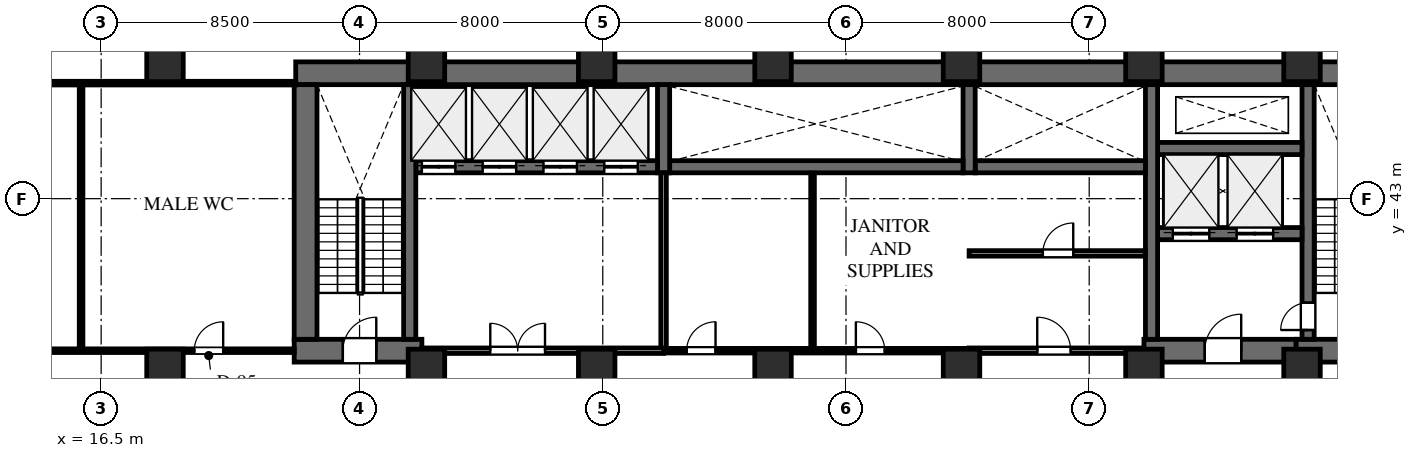
"""IFC4 building model, lengths in metres.
Left out: names, types, materials, properties, quantities, classifications, styles, units other than length and angle.
Written with IfcOpenShell. Run it as: python <this file> out.ifc"""

import sys

from ifc_helpers import new_model, si_unit, direction, frame, frame_2d, origin, origin_2d, place, context, subcontext, project, spatial, rectangle, extrude, element, fill, save


model = new_model("IFC4")
c1 = context("Model", 3, precision=1e-05, world=origin(), true_north=direction((0.0, 1.0)))
c2 = subcontext(c1, "Body", "Model", "MODEL_VIEW")
j1 = project(units=[si_unit("LENGTHUNIT", "METRE"), si_unit("PLANEANGLEUNIT", "RADIAN")], contexts=[c1])
p1 = place(None, origin())
s1 = spatial("IfcSite", under=j1, at=p1, CompositionType="ELEMENT")
p2 = place(p1, origin())
s2 = spatial("IfcBuilding", under=s1, at=p2, CompositionType="ELEMENT")
p3 = place(p2, frame((0.0, 0.0, 29.5)))
s3 = spatial("IfcBuildingStorey", under=s2, at=p3, CompositionType="ELEMENT", Elevation=29.5)
p4 = place(p3, frame((22.9, 47.125, 0.0), z_axis=(0.0, 0.0, 1.0), x_axis=(1.0, 0.0, 0.0)))
e1 = element("IfcWall", 1, at=p4, inside=s3, PredefinedType="SHEAR", context=c2, shape_type="SweptSolid", body=[
    extrude(rectangle(XDim=43.7, YDim=0.75, at=frame_2d((21.85, 0.0))), origin(), (0.0, 0.0, 1.0), 4.0),
])
p5 = place(p3, frame((55.8, 38.0, 0.0), z_axis=(0.0, 0.0, 1.0), x_axis=(1.0, 0.0, 0.0)))
e2 = element("IfcWall", 2, at=p5, inside=s3, PredefinedType="SHEAR", context=c2, shape_type="SweptSolid", body=[
    extrude(rectangle(XDim=10.8, YDim=0.75, at=frame_2d((5.4, 0.0))), origin(), (0.0, 0.0, 1.0), 4.0),
])
p6 = place(p5, frame((1.5, 0.0, 0.0)))
e3 = element("IfcOpeningElement", 3, at=p6, cuts=e2, PredefinedType="OPENING", context=c2, shape_type="SweptSolid", body=[
    extrude(rectangle(XDim=1.1, YDim=2.2, at=frame_2d((0.55, 1.1))), frame((0.0, 0.385, 0.0), z_axis=(0.0, -1.0, 0.0), x_axis=(1.0, 0.0, 0.0)), (0.0, 0.0, 1.0), 0.77),
])
p7 = place(p5, frame((4.82, 0.0, 0.0)))
e4 = element("IfcOpeningElement", 4, at=p7, cuts=e2, PredefinedType="OPENING", context=c2, shape_type="SweptSolid", body=[
    extrude(rectangle(XDim=1.0, YDim=2.15, at=frame_2d((0.5, 1.075))), frame((0.0, 0.385, 0.0), z_axis=(0.0, -1.0, 0.0), x_axis=(1.0, 0.0, 0.0)), (0.0, 0.0, 1.0), 0.77),
])
p8 = place(p5, frame((8.05, 0.0, 0.0)))
e5 = element("IfcOpeningElement", 5, at=p8, cuts=e2, PredefinedType="OPENING", context=c2, shape_type="SweptSolid", body=[
    extrude(rectangle(XDim=1.1, YDim=2.2, at=frame_2d((0.55, 1.1))), frame((0.0, 0.385, 0.0), z_axis=(0.0, -1.0, 0.0), x_axis=(1.0, 0.0, 0.0)), (0.0, 0.0, 1.0), 0.77),
])
p9 = place(p3, frame((56.2, 38.375, 0.0), z_axis=(0.0, 0.0, 1.0), x_axis=(0.0, 1.0, 0.0)))
e6 = element("IfcWall", 6, at=p9, inside=s3, PredefinedType="SHEAR", context=c2, shape_type="SweptSolid", body=[
    extrude(rectangle(XDim=8.375, YDim=0.4, at=frame_2d((4.188, 0.0))), origin(), (0.0, 0.0, 1.0), 4.0),
])
p10 = place(p9, frame((0.305, 0.0, 0.0)))
e7 = element("IfcOpeningElement", 7, at=p10, cuts=e6, PredefinedType="OPENING", context=c2, shape_type="SweptSolid", body=[
    extrude(rectangle(XDim=0.9, YDim=2.15, at=frame_2d((0.45, 1.075))), frame((0.0, 0.21, 0.0), z_axis=(0.0, -1.0, 0.0), x_axis=(1.0, 0.0, 0.0)), (0.0, 0.0, 1.0), 0.42),
])
p11 = place(p3, frame((50.8, 38.0, 0.0), z_axis=(0.0, 0.0, 1.0), x_axis=(1.0, 0.0, 0.0)))
e8 = element("IfcWall", 8, at=p11, inside=s3, PredefinedType="SHEAR", context=c2, shape_type="SweptSolid", body=[
    extrude(rectangle(XDim=5.0, YDim=0.75, at=frame_2d((2.5, 0.0))), origin(), (0.0, 0.0, 1.0), 4.0),
])
p12 = place(p11, frame((2.0, 0.0, 0.0)))
e9 = element("IfcOpeningElement", 9, at=p12, cuts=e8, PredefinedType="OPENING", context=c2, shape_type="SweptSolid", body=[
    extrude(rectangle(XDim=1.2, YDim=2.2, at=frame_2d((0.6, 1.1))), frame((0.0, 0.385, 0.0), z_axis=(0.0, -1.0, 0.0), x_axis=(1.0, 0.0, 0.0)), (0.0, 0.0, 1.0), 0.77),
])
p13 = place(p3, frame((51.25, 41.85, 0.0), z_axis=(0.0, 0.0, 1.0), x_axis=(1.0, 0.0, 0.0)))
e10 = element("IfcWall", 10, at=p13, inside=s3, PredefinedType="SHEAR", context=c2, shape_type="SweptSolid", body=[
    extrude(rectangle(XDim=4.75, YDim=0.4, at=frame_2d((2.375, 0.0))), origin(), (0.0, 0.0, 1.0), 4.0),
])
p14 = place(p13, frame((0.5, 0.0, 0.0)))
e11 = element("IfcOpeningElement", 11, at=p14, cuts=e10, PredefinedType="OPENING", context=c2, shape_type="SweptSolid", body=[
    extrude(rectangle(XDim=1.2, YDim=2.2, at=frame_2d((0.6, 1.1))), frame((0.0, 0.21, 0.0), z_axis=(0.0, -1.0, 0.0), x_axis=(1.0, 0.0, 0.0)), (0.0, 0.0, 1.0), 0.42),
])
p15 = place(p13, frame((2.6, 0.0, 0.0)))
e12 = element("IfcOpeningElement", 12, at=p15, cuts=e10, PredefinedType="OPENING", context=c2, shape_type="SweptSolid", body=[
    extrude(rectangle(XDim=1.2, YDim=2.2, at=frame_2d((0.6, 1.1))), frame((0.0, 0.21, 0.0), z_axis=(0.0, -1.0, 0.0), x_axis=(1.0, 0.0, 0.0)), (0.0, 0.0, 1.0), 0.42),
])
p16 = place(p3, frame((51.25, 44.65, 0.0), z_axis=(0.0, 0.0, 1.0), x_axis=(1.0, 0.0, 0.0)))
e13 = element("IfcWall", 13, at=p16, inside=s3, PredefinedType="SHEAR", context=c2, shape_type="SweptSolid", body=[
    extrude(rectangle(XDim=4.75, YDim=0.4, at=frame_2d((2.375, 0.0))), origin(), (0.0, 0.0, 1.0), 4.0),
])
p17 = place(p3, frame((51.05, 38.375, 0.0), z_axis=(0.0, 0.0, 1.0), x_axis=(0.0, 1.0, 0.0)))
e14 = element("IfcWall", 14, at=p17, inside=s3, PredefinedType="SHEAR", context=c2, shape_type="SweptSolid", body=[
    extrude(rectangle(XDim=8.375, YDim=0.4, at=frame_2d((4.188, 0.0))), origin(), (0.0, 0.0, 1.0), 4.0),
])
p18 = place(p3, frame((45.25, 44.05, 0.0), z_axis=(0.0, 0.0, 1.0), x_axis=(1.0, 0.0, 0.0)))
e15 = element("IfcWall", 15, at=p18, inside=s3, PredefinedType="SHEAR", context=c2, shape_type="SweptSolid", body=[
    extrude(rectangle(XDim=5.6, YDim=0.4, at=frame_2d((2.8, 0.0))), origin(), (0.0, 0.0, 1.0), 4.0),
])
p19 = place(p3, frame((45.05, 43.85, 0.0), z_axis=(0.0, 0.0, 1.0), x_axis=(0.0, 1.0, 0.0)))
e16 = element("IfcWall", 16, at=p19, inside=s3, PredefinedType="SHEAR", context=c2, shape_type="SweptSolid", body=[
    extrude(rectangle(XDim=2.9, YDim=0.4, at=frame_2d((1.45, 0.0))), origin(), (0.0, 0.0, 1.0), 4.0),
])
p20 = place(p3, frame((35.2, 44.05, 0.0), z_axis=(0.0, 0.0, 1.0), x_axis=(1.0, 0.0, 0.0)))
e17 = element("IfcWall", 17, at=p20, inside=s3, PredefinedType="SHEAR", context=c2, shape_type="SweptSolid", body=[
    extrude(rectangle(XDim=9.65, YDim=0.4, at=frame_2d((4.825, 0.0))), origin(), (0.0, 0.0, 1.0), 4.0),
])
p21 = place(p3, frame((35.0, 43.85, 0.0), z_axis=(0.0, 0.0, 1.0), x_axis=(0.0, 1.0, 0.0)))
e18 = element("IfcWall", 18, at=p21, inside=s3, PredefinedType="SHEAR", context=c2, shape_type="SweptSolid", body=[
    extrude(rectangle(XDim=2.9, YDim=0.4, at=frame_2d((1.45, 0.0))), origin(), (0.0, 0.0, 1.0), 4.0),
])
p22 = place(p3, frame((26.85, 44.05, 0.0), z_axis=(0.0, 0.0, 1.0), x_axis=(1.0, 0.0, 0.0)))
e19 = element("IfcWall", 19, at=p22, inside=s3, PredefinedType="SHEAR", context=c2, shape_type="SweptSolid", body=[
    extrude(rectangle(XDim=7.95, YDim=0.4, at=frame_2d((3.975, 0.0))), origin(), (0.0, 0.0, 1.0), 4.0),
])
p23 = place(p22, frame((0.2, 0.0, 0.0)))
e20 = element("IfcOpeningElement", 20, at=p23, cuts=e19, PredefinedType="OPENING", context=c2, shape_type="SweptSolid", body=[
    extrude(rectangle(XDim=1.1, YDim=2.2, at=frame_2d((0.55, 1.1))), frame((0.0, 0.21, 0.0), z_axis=(0.0, -1.0, 0.0), x_axis=(1.0, 0.0, 0.0)), (0.0, 0.0, 1.0), 0.42),
])
p24 = place(p22, frame((2.2, 0.0, 0.0)))
e21 = element("IfcOpeningElement", 21, at=p24, cuts=e19, PredefinedType="OPENING", context=c2, shape_type="SweptSolid", body=[
    extrude(rectangle(XDim=1.1, YDim=2.2, at=frame_2d((0.55, 1.1))), frame((0.0, 0.21, 0.0), z_axis=(0.0, -1.0, 0.0), x_axis=(1.0, 0.0, 0.0)), (0.0, 0.0, 1.0), 0.42),
])
p25 = place(p22, frame((4.2, 0.0, 0.0)))
e22 = element("IfcOpeningElement", 22, at=p25, cuts=e19, PredefinedType="OPENING", context=c2, shape_type="SweptSolid", body=[
    extrude(rectangle(XDim=1.1, YDim=2.2, at=frame_2d((0.55, 1.1))), frame((0.0, 0.21, 0.0), z_axis=(0.0, -1.0, 0.0), x_axis=(1.0, 0.0, 0.0)), (0.0, 0.0, 1.0), 0.42),
])
p26 = place(p22, frame((6.2, 0.0, 0.0)))
e23 = element("IfcOpeningElement", 23, at=p26, cuts=e19, PredefinedType="OPENING", context=c2, shape_type="SweptSolid", body=[
    extrude(rectangle(XDim=1.1, YDim=2.2, at=frame_2d((0.55, 1.1))), frame((0.0, 0.21, 0.0), z_axis=(0.0, -1.0, 0.0), x_axis=(1.0, 0.0, 0.0)), (0.0, 0.0, 1.0), 0.42),
])
p27 = place(p3, frame((22.85, 38.0, 0.0), z_axis=(0.0, 0.0, 1.0), x_axis=(1.0, 0.0, 0.0)))
e24 = element("IfcWall", 24, at=p27, inside=s3, PredefinedType="SHEAR", context=c2, shape_type="SweptSolid", body=[
    extrude(rectangle(XDim=4.2, YDim=0.75, at=frame_2d((2.1, 0.0))), origin(), (0.0, 0.0, 1.0), 4.0),
])
p28 = place(p27, frame((1.6, 0.0, 0.0)))
e25 = element("IfcOpeningElement", 25, at=p28, cuts=e24, PredefinedType="OPENING", context=c2, shape_type="SweptSolid", body=[
    extrude(rectangle(XDim=1.1, YDim=2.2, at=frame_2d((0.55, 1.1))), frame((0.0, 0.385, 0.0), z_axis=(0.0, -1.0, 0.0), x_axis=(1.0, 0.0, 0.0)), (0.0, 0.0, 1.0), 0.77),
])
p29 = place(p3, frame((23.225, 38.375, 0.0), z_axis=(0.0, 0.0, 1.0), x_axis=(0.0, 1.0, 0.0)))
e26 = element("IfcWall", 26, at=p29, inside=s3, PredefinedType="SHEAR", context=c2, shape_type="SweptSolid", body=[
    extrude(rectangle(XDim=8.375, YDim=0.75, at=frame_2d((4.188, 0.0))), origin(), (0.0, 0.0, 1.0), 4.0),
])
p30 = place(p3, frame((26.65, 38.375, 0.0), z_axis=(0.0, 0.0, 1.0), x_axis=(0.0, 1.0, 0.0)))
e27 = element("IfcWall", 27, at=p30, inside=s3, PredefinedType="SHEAR", context=c2, shape_type="SweptSolid", body=[
    extrude(rectangle(XDim=8.375, YDim=0.4, at=frame_2d((4.188, 0.0))), origin(), (0.0, 0.0, 1.0), 4.0),
])
for number, where, z_axis, x_axis in (
    (28, (56.0, 47.55, 0.0), (0.0, 0.0, 1.0), (1.0, 0.0, 0.0)),
    (29, (56.0, 37.35, 0.0), (0.0, 0.0, 1.0), (1.0, 0.0, 0.0)),
    (30, (50.8, 47.55, 0.0), (0.0, 0.0, 1.0), (1.0, 0.0, 0.0)),
    (31, (50.8, 37.35, 0.0), (0.0, 0.0, 1.0), (1.0, 0.0, 0.0)),
    (32, (44.8, 37.35, 0.0), (0.0, 0.0, 1.0), (1.0, 0.0, 0.0)),
    (33, (44.8, 47.55, 0.0), (0.0, 0.0, 1.0), (1.0, 0.0, 0.0)),
    (34, (38.6, 37.35, 0.0), (0.0, 0.0, 1.0), (1.0, 0.0, 0.0)),
    (35, (38.6, 47.55, 0.0), (0.0, 0.0, 1.0), (1.0, 0.0, 0.0)),
    (36, (32.8, 37.35, 0.0), (0.0, 0.0, 1.0), (1.0, 0.0, 0.0)),
    (37, (32.8, 47.55, 0.0), (0.0, 0.0, 1.0), (1.0, 0.0, 0.0)),
    (38, (27.2, 37.35, 0.0), (0.0, 0.0, 1.0), (1.0, 0.0, 0.0)),
    (39, (27.2, 47.55, 0.0), (0.0, 0.0, 1.0), (1.0, 0.0, 0.0)),
    (40, (18.6, 37.35, 0.0), (0.0, 0.0, 1.0), (1.0, 0.0, 0.0)),
    (41, (18.6, 47.55, 0.0), (0.0, 0.0, 1.0), (1.0, 0.0, 0.0)),
):
    element("IfcColumn", number, at=place(p3, frame(where, z_axis=z_axis, x_axis=x_axis)), inside=s3, PredefinedType="COLUMN", context=c2, shape_type="SweptSolid", body=[
        extrude(rectangle(XDim=1.2, YDim=1.4, at=origin_2d()), origin(), (0.0, 0.0, 1.0), 4.0),
    ])
p31 = place(p3, frame((45.05, 38.0, 0.0), z_axis=(0.0, 0.0, 1.0), x_axis=(1.0, 0.0, 0.0)))
e42 = element("IfcWall", 42, at=p31, inside=s3, PredefinedType="STANDARD", context=c2, shape_type="SweptSolid", body=[
    extrude(rectangle(XDim=5.75, YDim=0.18, at=frame_2d((2.875, 0.0))), origin(), (0.0, 0.0, 1.0), 2.813),
])
p32 = place(p31, frame((2.24, 0.0, 0.0)))
e43 = element("IfcOpeningElement", 43, at=p32, cuts=e42, PredefinedType="OPENING", context=c2, shape_type="SweptSolid", body=[
    extrude(rectangle(XDim=1.1, YDim=2.2, at=frame_2d((0.55, 1.1))), frame((0.0, 0.1, 0.0), z_axis=(0.0, -1.0, 0.0), x_axis=(1.0, 0.0, 0.0)), (0.0, 0.0, 1.0), 0.2),
])
p33 = place(p3, frame((45.05, 41.2, 0.0), z_axis=(0.0, 0.0, 1.0), x_axis=(1.0, 0.0, 0.0)))
e44 = element("IfcWall", 44, at=p33, inside=s3, PredefinedType="STANDARD", context=c2, shape_type="SweptSolid", body=[
    extrude(rectangle(XDim=5.792, YDim=0.18, at=frame_2d((2.896, 0.0))), origin(), (0.0, 0.0, 1.0), 2.813),
])
p34 = place(p33, frame((2.425, 0.0, 0.0)))
e45 = element("IfcOpeningElement", 45, at=p34, cuts=e44, PredefinedType="OPENING", context=c2, shape_type="SweptSolid", body=[
    extrude(rectangle(XDim=1.0, YDim=2.15, at=frame_2d((0.5, 1.075))), frame((0.0, 0.1, 0.0), z_axis=(0.0, -1.0, 0.0), x_axis=(1.0, 0.0, 0.0)), (0.0, 0.0, 1.0), 0.2),
])
p35 = place(p3, frame((35.0, 38.0, 0.0), z_axis=(0.0, 0.0, 1.0), x_axis=(0.0, 1.0, 0.0)))
e46 = element("IfcWall", 46, at=p35, inside=s3, PredefinedType="STANDARD", context=c2, shape_type="SweptSolid", body=[
    extrude(rectangle(XDim=5.85, YDim=0.18, at=frame_2d((2.925, 0.0))), origin(), (0.0, 0.0, 1.0), 3.74),
])
p36 = place(p3, frame((27.05, 38.0, 0.0), z_axis=(0.0, 0.0, 1.0), x_axis=(1.0, 0.0, 0.0)))
e47 = element("IfcWall", 47, at=p36, inside=s3, PredefinedType="STANDARD", context=c2, shape_type="SweptSolid", body=[
    extrude(rectangle(XDim=7.95, YDim=0.18, at=frame_2d((3.975, 0.0))), origin(), (0.0, 0.0, 1.0), 2.813),
])
p37 = place(p36, frame((2.25, 0.0, 0.0)))
e48 = element("IfcOpeningElement", 48, at=p37, cuts=e47, PredefinedType="OPENING", context=c2, shape_type="SweptSolid", body=[
    extrude(rectangle(XDim=1.8, YDim=2.2, at=frame_2d((0.9, 1.1))), frame((0.0, 0.1, 0.0), z_axis=(0.0, -1.0, 0.0), x_axis=(1.0, 0.0, 0.0)), (0.0, 0.0, 1.0), 0.2),
])
p38 = place(p3, frame((35.0, 38.0, 0.0), z_axis=(0.0, 0.0, 1.0), x_axis=(1.0, 0.0, 0.0)))
e49 = element("IfcWall", 49, at=p38, inside=s3, PredefinedType="PARTITIONING", context=c2, shape_type="SweptSolid", body=[
    extrude(rectangle(XDim=10.05, YDim=0.15, at=frame_2d((5.025, 0.0))), origin(), (0.0, 0.0, 1.0), 2.813),
])
p39 = place(p38, frame((0.759, 0.0, 0.0)))
e50 = element("IfcOpeningElement", 50, at=p39, cuts=e49, PredefinedType="OPENING", context=c2, shape_type="SweptSolid", body=[
    extrude(rectangle(XDim=0.95, YDim=2.15, at=frame_2d((0.475, 1.075))), frame((0.0, 0.085, 0.0), z_axis=(0.0, -1.0, 0.0), x_axis=(1.0, 0.0, 0.0)), (0.0, 0.0, 1.0), 0.17),
])
p40 = place(p38, frame((6.325, 0.0, 0.0)))
e51 = element("IfcOpeningElement", 51, at=p40, cuts=e49, PredefinedType="OPENING", context=c2, shape_type="SweptSolid", body=[
    extrude(rectangle(XDim=0.95, YDim=2.15, at=frame_2d((0.475, 1.075))), frame((0.0, 0.085, 0.0), z_axis=(0.0, -1.0, 0.0), x_axis=(1.0, 0.0, 0.0)), (0.0, 0.0, 1.0), 0.17),
])
p41 = place(p3, frame((39.9, 38.068, 0.0), z_axis=(0.0, 0.0, 1.0), x_axis=(0.0, 1.0, 0.0)))
e52 = element("IfcWall", 52, at=p41, inside=s3, PredefinedType="PARTITIONING", context=c2, shape_type="SweptSolid", body=[
    extrude(rectangle(XDim=5.774, YDim=0.12, at=frame_2d((2.887, 0.0))), origin(), (0.0, 0.0, 1.0), 3.74),
])
p42 = place(p3, frame((6.22, 38.0, 0.0), z_axis=(0.0, 0.0, 1.0), x_axis=(1.0, 0.0, 0.0)))
e53 = element("IfcWall", 53, at=p42, inside=s3, PredefinedType="PARTITIONING", context=c2, shape_type="SweptSolid", body=[
    extrude(rectangle(XDim=16.63, YDim=0.12, at=frame_2d((8.315, 0.0))), origin(), (0.0, 0.0, 1.0), 2.813),
])
p43 = place(p42, frame((0.424, 0.0, 0.0)))
e54 = element("IfcOpeningElement", 54, at=p43, cuts=e53, PredefinedType="OPENING", context=c2, shape_type="SweptSolid", body=[
    extrude(rectangle(XDim=0.95, YDim=2.15, at=frame_2d((0.475, 1.075))), frame((0.0, 0.07, 0.0), z_axis=(0.0, -1.0, 0.0), x_axis=(1.0, 0.0, 0.0)), (0.0, 0.0, 1.0), 0.14),
])
p44 = place(p42, frame((5.444, 0.0, 0.0)))
e55 = element("IfcOpeningElement", 55, at=p44, cuts=e53, PredefinedType="OPENING", context=c2, shape_type="SweptSolid", body=[
    extrude(rectangle(XDim=0.95, YDim=2.15, at=frame_2d((0.475, 1.075))), frame((0.0, 0.07, 0.0), z_axis=(0.0, -1.0, 0.0), x_axis=(1.0, 0.0, 0.0)), (0.0, 0.0, 1.0), 0.14),
])
p45 = place(p42, frame((13.344, 0.0, 0.0)))
e56 = element("IfcOpeningElement", 56, at=p45, cuts=e53, PredefinedType="OPENING", context=c2, shape_type="SweptSolid", body=[
    extrude(rectangle(XDim=0.95, YDim=2.15, at=frame_2d((0.475, 1.075))), frame((0.0, 0.07, 0.0), z_axis=(0.0, -1.0, 0.0), x_axis=(1.0, 0.0, 0.0)), (0.0, 0.0, 1.0), 0.14),
])
p46 = place(p3, frame((6.22, 46.8, 0.0), z_axis=(0.0, 0.0, 1.0), x_axis=(1.0, 0.0, 0.0)))
e57 = element("IfcWall", 57, at=p46, inside=s3, PredefinedType="PARTITIONING", context=c2, shape_type="SweptSolid", body=[
    extrude(rectangle(XDim=16.68, YDim=0.12, at=frame_2d((8.34, 0.0))), origin(), (0.0, 0.0, 1.0), 2.813),
])
p47 = place(p3, frame((15.84, 38.068, 0.0), z_axis=(0.0, 0.0, 1.0), x_axis=(0.0, 1.0, 0.0)))
e58 = element("IfcWall", 58, at=p47, inside=s3, PredefinedType="PARTITIONING", context=c2, shape_type="SweptSolid", body=[
    extrude(rectangle(XDim=8.664, YDim=0.12, at=frame_2d((4.332, 0.0))), origin(), (0.0, 0.0, 1.0), 3.74),
])
p48 = place(p12, origin())
e59 = element("IfcDoor", 59, at=p48, inside=s3, OperationType="SINGLE_SWING_RIGHT", PredefinedType="DOOR", context=c2, shape_type="SweptSolid", body=[
    extrude(rectangle(XDim=1.2, YDim=2.2, at=frame_2d((0.6, 1.1))), frame((0.0, 0.025, 0.0), z_axis=(0.0, -1.0, 0.0), x_axis=(1.0, 0.0, 0.0)), (0.0, 0.0, 1.0), 0.05),
])
fill(e9, e59)
p49 = place(p10, origin())
e60 = element("IfcDoor", 60, at=p49, inside=s3, OperationType="SINGLE_SWING_LEFT", PredefinedType="DOOR", context=c2, shape_type="SweptSolid", body=[
    extrude(rectangle(XDim=0.9, YDim=2.15, at=frame_2d((0.45, 1.075))), frame((0.0, 0.025, 0.0), z_axis=(0.0, -1.0, 0.0), x_axis=(1.0, 0.0, 0.0)), (0.0, 0.0, 1.0), 0.05),
])
fill(e7, e60)
p50 = place(p28, origin())
e61 = element("IfcDoor", 61, at=p50, inside=s3, OperationType="SINGLE_SWING_RIGHT", PredefinedType="DOOR", context=c2, shape_type="SweptSolid", body=[
    extrude(rectangle(XDim=1.1, YDim=2.2, at=frame_2d((0.55, 1.1))), frame((0.0, 0.025, 0.0), z_axis=(0.0, -1.0, 0.0), x_axis=(1.0, 0.0, 0.0)), (0.0, 0.0, 1.0), 0.05),
])
fill(e25, e61)
p51 = place(p23, origin())
e62 = element("IfcDoor", 62, at=p51, inside=s3, OperationType="DOUBLE_DOOR_SLIDING", PredefinedType="DOOR", context=c2, shape_type="SweptSolid", body=[
    extrude(rectangle(XDim=1.1, YDim=2.2, at=frame_2d((0.55, 1.1))), frame((0.0, 0.025, 0.0), z_axis=(0.0, -1.0, 0.0), x_axis=(1.0, 0.0, 0.0)), (0.0, 0.0, 1.0), 0.05),
])
fill(e20, e62)
p52 = place(p24, origin())
e63 = element("IfcDoor", 63, at=p52, inside=s3, OperationType="DOUBLE_DOOR_SLIDING", PredefinedType="DOOR", context=c2, shape_type="SweptSolid", body=[
    extrude(rectangle(XDim=1.1, YDim=2.2, at=frame_2d((0.55, 1.1))), frame((0.0, 0.025, 0.0), z_axis=(0.0, -1.0, 0.0), x_axis=(1.0, 0.0, 0.0)), (0.0, 0.0, 1.0), 0.05),
])
fill(e21, e63)
p53 = place(p25, origin())
e64 = element("IfcDoor", 64, at=p53, inside=s3, OperationType="DOUBLE_DOOR_SLIDING", PredefinedType="DOOR", context=c2, shape_type="SweptSolid", body=[
    extrude(rectangle(XDim=1.1, YDim=2.2, at=frame_2d((0.55, 1.1))), frame((0.0, 0.025, 0.0), z_axis=(0.0, -1.0, 0.0), x_axis=(1.0, 0.0, 0.0)), (0.0, 0.0, 1.0), 0.05),
])
fill(e22, e64)
p54 = place(p26, origin())
e65 = element("IfcDoor", 65, at=p54, inside=s3, OperationType="DOUBLE_DOOR_SLIDING", PredefinedType="DOOR", context=c2, shape_type="SweptSolid", body=[
    extrude(rectangle(XDim=1.1, YDim=2.2, at=frame_2d((0.55, 1.1))), frame((0.0, 0.025, 0.0), z_axis=(0.0, -1.0, 0.0), x_axis=(1.0, 0.0, 0.0)), (0.0, 0.0, 1.0), 0.05),
])
fill(e23, e65)
p55 = place(p14, origin())
e66 = element("IfcDoor", 66, at=p55, inside=s3, OperationType="DOUBLE_DOOR_SLIDING", PredefinedType="DOOR", context=c2, shape_type="SweptSolid", body=[
    extrude(rectangle(XDim=1.2, YDim=2.2, at=frame_2d((0.6, 1.1))), frame((0.0, 0.025, 0.0), z_axis=(0.0, -1.0, 0.0), x_axis=(1.0, 0.0, 0.0)), (0.0, 0.0, 1.0), 0.05),
])
fill(e11, e66)
p56 = place(p15, origin())
e67 = element("IfcDoor", 67, at=p56, inside=s3, OperationType="DOUBLE_DOOR_SLIDING", PredefinedType="DOOR", context=c2, shape_type="SweptSolid", body=[
    extrude(rectangle(XDim=1.2, YDim=2.2, at=frame_2d((0.6, 1.1))), frame((0.0, 0.025, 0.0), z_axis=(0.0, -1.0, 0.0), x_axis=(1.0, 0.0, 0.0)), (0.0, 0.0, 1.0), 0.05),
])
fill(e12, e67)
p57 = place(p34, origin())
e68 = element("IfcDoor", 68, at=p57, inside=s3, OperationType="SINGLE_SWING_RIGHT", PredefinedType="DOOR", context=c2, shape_type="SweptSolid", body=[
    extrude(rectangle(XDim=1.0, YDim=2.15, at=frame_2d((0.5, 1.075))), frame((0.0, 0.025, 0.0), z_axis=(0.0, -1.0, 0.0), x_axis=(1.0, 0.0, 0.0)), (0.0, 0.0, 1.0), 0.05),
])
fill(e45, e68)
p58 = place(p32, origin())
e69 = element("IfcDoor", 69, at=p58, inside=s3, OperationType="SINGLE_SWING_LEFT", PredefinedType="DOOR", context=c2, shape_type="SweptSolid", body=[
    extrude(rectangle(XDim=1.1, YDim=2.2, at=frame_2d((0.55, 1.1))), frame((0.0, 0.025, 0.0), z_axis=(0.0, -1.0, 0.0), x_axis=(1.0, 0.0, 0.0)), (0.0, 0.0, 1.0), 0.05),
])
fill(e43, e69)
p59 = place(p37, origin())
e70 = element("IfcDoor", 70, at=p59, inside=s3, OperationType="DOUBLE_DOOR_SINGLE_SWING", PredefinedType="DOOR", context=c2, shape_type="SweptSolid", body=[
    extrude(rectangle(XDim=1.8, YDim=2.2, at=frame_2d((0.9, 1.1))), frame((0.0, 0.025, 0.0), z_axis=(0.0, -1.0, 0.0), x_axis=(1.0, 0.0, 0.0)), (0.0, 0.0, 1.0), 0.05),
])
fill(e48, e70)
p60 = place(p39, origin())
e71 = element("IfcDoor", 71, at=p60, inside=s3, OperationType="SINGLE_SWING_RIGHT", PredefinedType="DOOR", context=c2, shape_type="SweptSolid", body=[
    extrude(rectangle(XDim=0.95, YDim=2.15, at=frame_2d((0.475, 1.075))), frame((0.0, 0.025, 0.0), z_axis=(0.0, -1.0, 0.0), x_axis=(1.0, 0.0, 0.0)), (0.0, 0.0, 1.0), 0.05),
])
fill(e50, e71)
p61 = place(p40, origin())
e72 = element("IfcDoor", 72, at=p61, inside=s3, OperationType="SINGLE_SWING_LEFT", PredefinedType="DOOR", context=c2, shape_type="SweptSolid", body=[
    extrude(rectangle(XDim=0.95, YDim=2.15, at=frame_2d((0.475, 1.075))), frame((0.0, 0.025, 0.0), z_axis=(0.0, -1.0, 0.0), x_axis=(1.0, 0.0, 0.0)), (0.0, 0.0, 1.0), 0.05),
])
fill(e51, e72)
p62 = place(p45, origin())
e73 = element("IfcDoor", 73, at=p62, inside=s3, OperationType="SINGLE_SWING_RIGHT", PredefinedType="DOOR", context=c2, shape_type="SweptSolid", body=[
    extrude(rectangle(XDim=0.95, YDim=2.15, at=frame_2d((0.475, 1.075))), frame((0.0, 0.025, 0.0), z_axis=(0.0, -1.0, 0.0), x_axis=(1.0, 0.0, 0.0)), (0.0, 0.0, 1.0), 0.05),
])
fill(e56, e73)
save(model, sys.argv[1])
